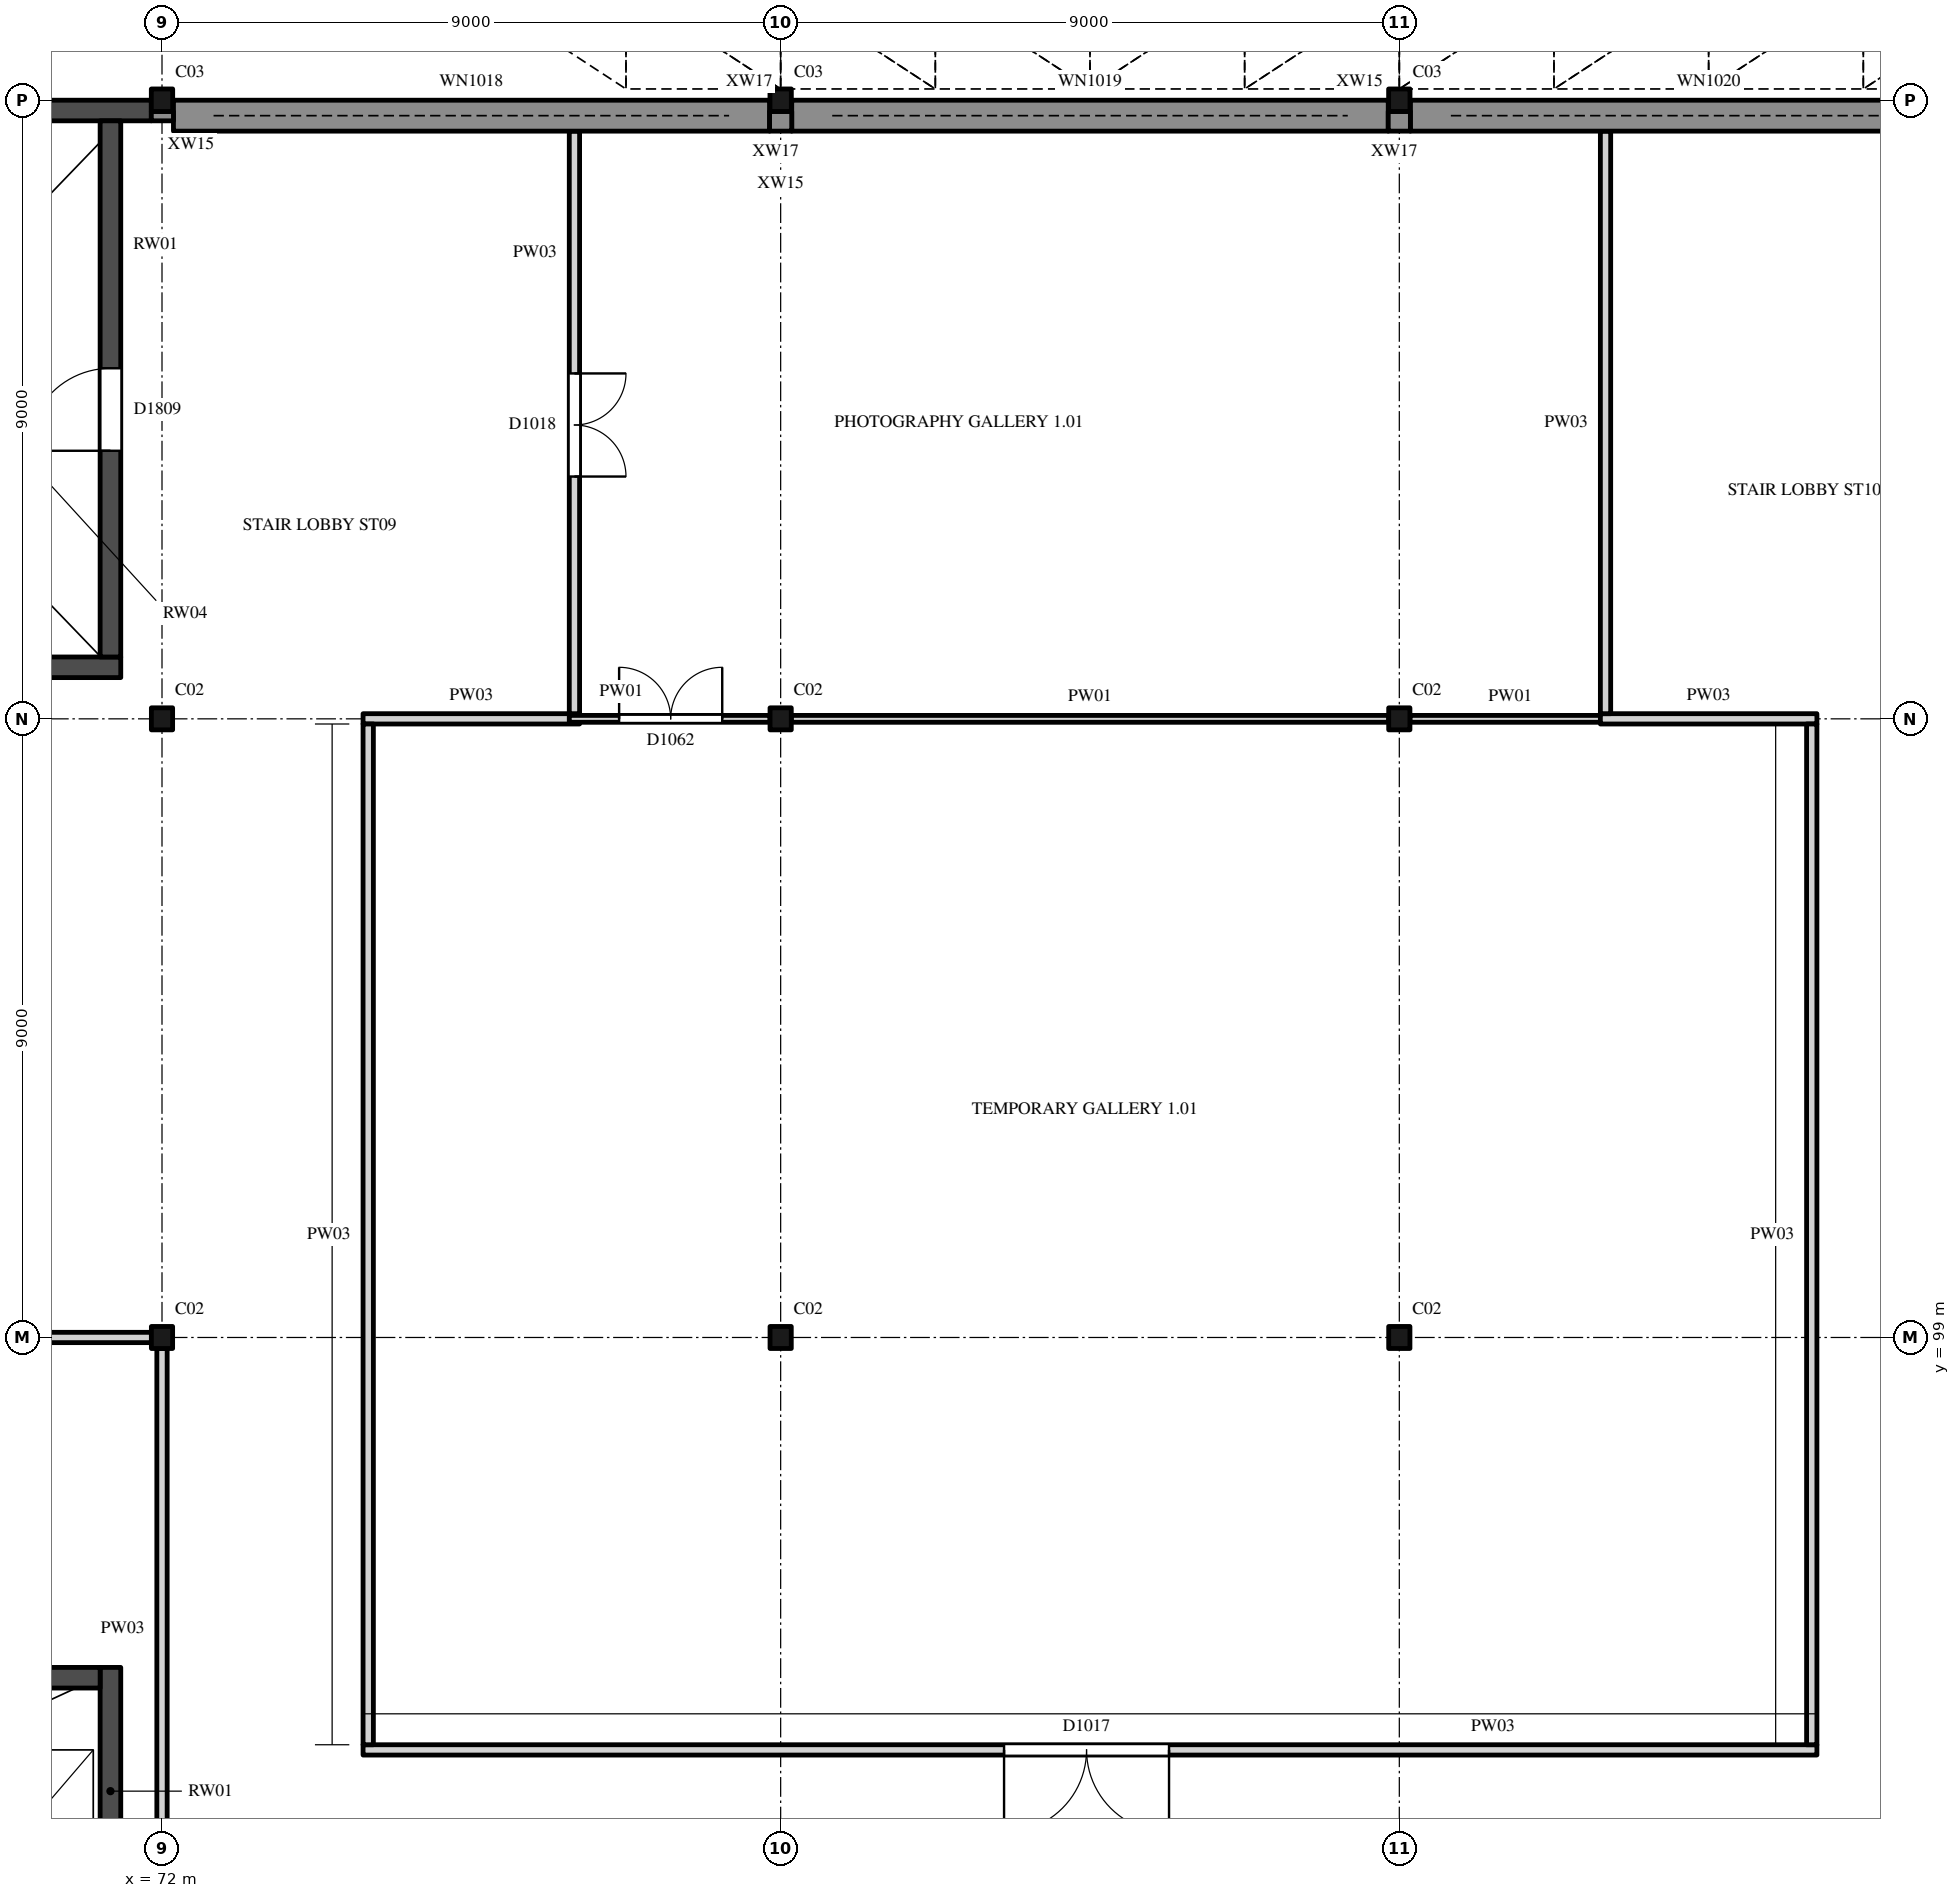
"""IFC4 building model, lengths in metres.
Left out: names, types, materials, properties, quantities, classifications, styles, units other than length and angle.
Written with IfcOpenShell. Run it as: python <this file> out.ifc"""

import sys

from ifc_helpers import new_model, si_unit, direction, frame, frame_2d, origin, origin_2d, place, context, subcontext, project, spatial, rectangle, i_section, extrude, element, fill, save


model = new_model("IFC4")
c1 = context("Model", 3, precision=1e-05, world=origin(), true_north=direction((0.0, 1.0)))
c2 = subcontext(c1, "Body", "Model", "MODEL_VIEW")
j1 = project(units=[si_unit("LENGTHUNIT", "METRE"), si_unit("PLANEANGLEUNIT", "RADIAN")], contexts=[c1])
p1 = place(None, origin())
s1 = spatial("IfcSite", under=j1, at=p1, CompositionType="ELEMENT")
p2 = place(p1, origin())
s2 = spatial("IfcBuilding", under=s1, at=p2, CompositionType="ELEMENT")
p3 = place(p2, frame((0.0, 0.0, 6.0)))
s3 = spatial("IfcBuildingStorey", under=s2, at=p3, CompositionType="ELEMENT", Elevation=6.0)
for number, where, z_axis, x_axis in (
    (1, (72.0, 99.0, 0.0), (0.0, 0.0, 1.0), (1.0, 0.0, 0.0)),
    (2, (81.0, 99.0, 0.0), (0.0, 0.0, 1.0), (1.0, 0.0, 0.0)),
    (3, (90.0, 99.0, 0.0), (0.0, 0.0, 1.0), (1.0, 0.0, 0.0)),
    (4, (72.0, 108.0, 0.0), (0.0, 0.0, 1.0), (1.0, 0.0, 0.0)),
    (5, (81.0, 108.0, 0.0), (0.0, 0.0, 1.0), (1.0, 0.0, 0.0)),
    (6, (90.0, 108.0, 0.0), (0.0, 0.0, 1.0), (1.0, 0.0, 0.0)),
):
    element("IfcColumn", number, at=place(p3, frame(where, z_axis=z_axis, x_axis=x_axis)), inside=s3, PredefinedType="COLUMN", context=c2, shape_type="SweptSolid", body=[
        extrude(i_section(OverallWidth=0.309, OverallDepth=0.321, WebThickness=0.014, FlangeThickness=0.022, FilletRadius=0.017, at=origin_2d()), origin(), (0.0, 0.0, 1.0), 5.0),
    ])
for number, where, z_axis, x_axis in (
    (7, (72.0, 117.0, 0.0), (0.0, 0.0, 1.0), (1.0, 0.0, 0.0)),
    (8, (81.0, 117.0, 0.0), (0.0, 0.0, 1.0), (1.0, 0.0, 0.0)),
    (9, (90.0, 117.0, 0.0), (0.0, 0.0, 1.0), (1.0, 0.0, 0.0)),
):
    element("IfcColumn", number, at=place(p3, frame(where, z_axis=z_axis, x_axis=x_axis)), inside=s3, PredefinedType="COLUMN", context=c2, shape_type="SweptSolid", body=[
        extrude(i_section(OverallWidth=0.311, OverallDepth=0.327, WebThickness=0.016, FlangeThickness=0.025, FilletRadius=0.017, at=origin_2d()), origin(), (0.0, 0.0, 1.0), 5.0),
    ])
p4 = place(p3, frame((63.6, 108.75, 0.0), z_axis=(0.0, 0.0, 1.0), x_axis=(1.0, 0.0, 0.0)))
e10 = element("IfcWall", 10, at=p4, inside=s3, PredefinedType="SHEAR", context=c2, shape_type="SweptSolid", body=[
    extrude(rectangle(XDim=7.8, YDim=0.3, at=frame_2d((3.9, 0.0))), origin(), (0.0, 0.0, 1.0), 5.0),
])
p5 = place(p3, frame((63.156, 116.85, 0.0), z_axis=(0.0, 0.0, 1.0), x_axis=(1.0, 0.0, 0.0)))
e11 = element("IfcWall", 11, at=p5, inside=s3, PredefinedType="SHEAR", context=c2, shape_type="SweptSolid", body=[
    extrude(rectangle(XDim=8.689, YDim=0.3, at=frame_2d((4.344, 0.0))), origin(), (0.0, 0.0, 1.0), 5.0),
])
p6 = place(p3, frame((71.25, 108.9, 0.0), z_axis=(0.0, 0.0, 1.0), x_axis=(0.0, 1.0, 0.0)))
e12 = element("IfcWall", 12, at=p6, inside=s3, PredefinedType="SHEAR", context=c2, shape_type="SweptSolid", body=[
    extrude(rectangle(XDim=7.8, YDim=0.3, at=frame_2d((3.9, 0.0))), origin(), (0.0, 0.0, 1.0), 5.0),
])
p7 = place(p6, frame((3.0, 0.0, 0.0)))
e13 = element("IfcOpeningElement", 13, at=p7, cuts=e12, PredefinedType="OPENING", context=c2, shape_type="SweptSolid", body=[
    extrude(rectangle(XDim=1.2, YDim=2.1, at=frame_2d((0.6, 1.05))), frame((0.0, 0.16, 0.0), z_axis=(0.0, -1.0, 0.0), x_axis=(1.0, 0.0, 0.0)), (0.0, 0.0, 1.0), 0.32),
])
p8 = place(p3, frame((71.25, 90.6, 0.0), z_axis=(0.0, 0.0, 1.0), x_axis=(0.0, 1.0, 0.0)))
e14 = element("IfcWall", 14, at=p8, inside=s3, PredefinedType="SHEAR", context=c2, shape_type="SweptSolid", body=[
    extrude(rectangle(XDim=3.6, YDim=0.3, at=frame_2d((1.8, 0.0))), origin(), (0.0, 0.0, 1.0), 5.0),
])
p9 = place(p3, frame((68.95, 94.05, 0.0), z_axis=(0.0, 0.0, 1.0), x_axis=(1.0, 0.0, 0.0)))
e15 = element("IfcWall", 15, at=p9, inside=s3, PredefinedType="SHEAR", context=c2, shape_type="SweptSolid", body=[
    extrude(rectangle(XDim=2.15, YDim=0.3, at=frame_2d((1.075, 0.0))), origin(), (0.0, 0.0, 1.0), 5.0),
])
p10 = place(p3, frame((72.167, 116.775, 0.0), z_axis=(0.0, 0.0, 1.0), x_axis=(1.0, 0.0, 0.0)))
e16 = element("IfcWall", 16, at=p10, inside=s3, PredefinedType="SOLIDWALL", context=c2, shape_type="SweptSolid", body=[
    extrude(rectangle(XDim=8.673, YDim=0.45, at=frame_2d((4.336, 0.0))), origin(), (0.0, 0.0, 1.0), 4.466),
])
p11 = place(p10, frame((0.583, 0.0, 1.6)))
e17 = element("IfcOpeningElement", 17, at=p11, cuts=e16, PredefinedType="OPENING", context=c2, shape_type="SweptSolid", body=[
    extrude(rectangle(XDim=7.5, YDim=1.2, at=frame_2d((3.75, 0.6))), frame((0.0, 0.235, 0.0), z_axis=(0.0, -1.0, 0.0), x_axis=(1.0, 0.0, 0.0)), (0.0, 0.0, 1.0), 0.47),
])
p12 = place(p3, frame((81.161, 116.775, 0.0), z_axis=(0.0, 0.0, 1.0), x_axis=(1.0, 0.0, 0.0)))
e18 = element("IfcWall", 18, at=p12, inside=s3, PredefinedType="SOLIDWALL", context=c2, shape_type="SweptSolid", body=[
    extrude(rectangle(XDim=8.678, YDim=0.45, at=frame_2d((4.339, 0.0))), origin(), (0.0, 0.0, 1.0), 4.466),
])
p13 = place(p12, frame((0.589, 0.0, 1.6)))
e19 = element("IfcOpeningElement", 19, at=p13, cuts=e18, PredefinedType="OPENING", context=c2, shape_type="SweptSolid", body=[
    extrude(rectangle(XDim=7.5, YDim=1.2, at=frame_2d((3.75, 0.6))), frame((0.0, 0.235, 0.0), z_axis=(0.0, -1.0, 0.0), x_axis=(1.0, 0.0, 0.0)), (0.0, 0.0, 1.0), 0.47),
])
p14 = place(p3, frame((90.161, 116.775, 0.0), z_axis=(0.0, 0.0, 1.0), x_axis=(1.0, 0.0, 0.0)))
e20 = element("IfcWall", 20, at=p14, inside=s3, PredefinedType="SOLIDWALL", context=c2, shape_type="SweptSolid", body=[
    extrude(rectangle(XDim=8.673, YDim=0.45, at=frame_2d((4.336, 0.0))), origin(), (0.0, 0.0, 1.0), 4.466),
])
p15 = place(p14, frame((0.589, 0.0, 1.6)))
e21 = element("IfcOpeningElement", 21, at=p15, cuts=e20, PredefinedType="OPENING", context=c2, shape_type="SweptSolid", body=[
    extrude(rectangle(XDim=7.5, YDim=1.2, at=frame_2d((3.75, 0.6))), frame((0.0, 0.235, 0.0), z_axis=(0.0, -1.0, 0.0), x_axis=(1.0, 0.0, 0.0)), (0.0, 0.0, 1.0), 0.47),
])
p16 = place(p3, frame((71.844, 116.768, 0.0), z_axis=(0.0, 0.0, 1.0), x_axis=(1.0, 0.0, 0.0)))
e22 = element("IfcWall", 22, at=p16, inside=s3, PredefinedType="SOLIDWALL", context=c2, shape_type="SweptSolid", body=[
    extrude(rectangle(XDim=0.322, YDim=0.136, at=frame_2d((0.161, 0.0))), origin(), (0.0, 0.0, 1.0), 5.0),
])
for number, where, z_axis, x_axis in (
    (23, (80.839, 116.693, 0.0), (0.0, 0.0, 1.0), (1.0, 0.0, 0.0)),
    (24, (89.839, 116.693, 0.0), (0.0, 0.0, 1.0), (1.0, 0.0, 0.0)),
):
    element("IfcWall", number, at=place(p3, frame(where, z_axis=z_axis, x_axis=x_axis)), inside=s3, PredefinedType="SOLIDWALL", context=c2, shape_type="SweptSolid", body=[
        extrude(rectangle(XDim=0.322, YDim=0.286, at=frame_2d((0.161, 0.0))), origin(), (0.0, 0.0, 1.0), 4.466),
    ])
p17 = place(p3, frame((74.925, 93.0, 0.0), z_axis=(0.0, 0.0, 1.0), x_axis=(1.0, 0.0, 0.0)))
e25 = element("IfcWall", 25, at=p17, inside=s3, PredefinedType="PARTITIONING", context=c2, shape_type="SweptSolid", body=[
    extrude(rectangle(XDim=21.15, YDim=0.15, at=frame_2d((10.575, 0.0))), origin(), (0.0, 0.0, 1.0), 4.473),
])
p18 = place(p17, frame((9.325, 0.0, 0.0)))
e26 = element("IfcOpeningElement", 26, at=p18, cuts=e25, PredefinedType="OPENING", context=c2, shape_type="SweptSolid", body=[
    extrude(rectangle(XDim=2.4, YDim=3.0, at=frame_2d((1.2, 1.5))), frame((0.0, 0.085, 0.0), z_axis=(0.0, -1.0, 0.0), x_axis=(1.0, 0.0, 0.0)), (0.0, 0.0, 1.0), 0.17),
])
p19 = place(p3, frame((63.155, 99.0, 0.0), z_axis=(0.0, 0.0, 1.0), x_axis=(1.0, 0.0, 0.0)))
e27 = element("IfcWall", 27, at=p19, inside=s3, PredefinedType="PARTITIONING", context=c2, shape_type="SweptSolid", body=[
    extrude(rectangle(XDim=8.691, YDim=0.15, at=frame_2d((4.345, 0.0))), origin(), (0.0, 0.0, 1.0), 4.466),
])
p20 = place(p19, frame((3.85, 0.0, 0.0)))
e28 = element("IfcOpeningElement", 28, at=p20, cuts=e27, PredefinedType="OPENING", context=c2, shape_type="SweptSolid", body=[
    extrude(rectangle(XDim=1.0, YDim=2.4, at=frame_2d((0.5, 1.2))), frame((0.0, 0.085, 0.0), z_axis=(0.0, -1.0, 0.0), x_axis=(1.0, 0.0, 0.0)), (0.0, 0.0, 1.0), 0.17),
])
p21 = place(p3, frame((74.925, 108.0, 0.0), z_axis=(0.0, 0.0, 1.0), x_axis=(1.0, 0.0, 0.0)))
e29 = element("IfcWall", 29, at=p21, inside=s3, PredefinedType="PARTITIONING", context=c2, shape_type="SweptSolid", body=[
    extrude(rectangle(XDim=3.15, YDim=0.15, at=frame_2d((1.575, 0.0))), origin(), (0.0, 0.0, 1.0), 4.466),
])
p22 = place(p3, frame((77.925, 108.0, 0.0), z_axis=(0.0, 0.0, 1.0), x_axis=(1.0, 0.0, 0.0)))
e30 = element("IfcWall", 30, at=p22, inside=s3, PredefinedType="PARTITIONING", context=c2, shape_type="SweptSolid", body=[
    extrude(rectangle(XDim=2.92, YDim=0.1, at=frame_2d((1.46, 0.0))), origin(), (0.0, 0.0, 1.0), 4.466),
])
p23 = place(p22, frame((0.725, 0.0, 0.0)))
e31 = element("IfcOpeningElement", 31, at=p23, cuts=e30, PredefinedType="OPENING", context=c2, shape_type="SweptSolid", body=[
    extrude(rectangle(XDim=1.5, YDim=2.4, at=frame_2d((0.75, 1.2))), frame((0.0, 0.06, 0.0), z_axis=(0.0, -1.0, 0.0), x_axis=(1.0, 0.0, 0.0)), (0.0, 0.0, 1.0), 0.12),
])
p24 = place(p3, frame((81.155, 108.0, 0.0), z_axis=(0.0, 0.0, 1.0), x_axis=(1.0, 0.0, 0.0)))
e32 = element("IfcWall", 32, at=p24, inside=s3, PredefinedType="PARTITIONING", context=c2, shape_type="SweptSolid", body=[
    extrude(rectangle(XDim=8.691, YDim=0.1, at=frame_2d((4.345, 0.0))), origin(), (0.0, 0.0, 1.0), 4.466),
])
p25 = place(p3, frame((90.155, 108.0, 0.0), z_axis=(0.0, 0.0, 1.0), x_axis=(1.0, 0.0, 0.0)))
e33 = element("IfcWall", 33, at=p25, inside=s3, PredefinedType="PARTITIONING", context=c2, shape_type="SweptSolid", body=[
    extrude(rectangle(XDim=2.92, YDim=0.1, at=frame_2d((1.46, 0.0))), origin(), (0.0, 0.0, 1.0), 4.466),
])
p26 = place(p3, frame((92.925, 108.0, 0.0), z_axis=(0.0, 0.0, 1.0), x_axis=(1.0, 0.0, 0.0)))
e34 = element("IfcWall", 34, at=p26, inside=s3, PredefinedType="PARTITIONING", context=c2, shape_type="SweptSolid", body=[
    extrude(rectangle(XDim=3.15, YDim=0.15, at=frame_2d((1.575, 0.0))), origin(), (0.0, 0.0, 1.0), 4.466),
])
p27 = place(p3, frame((72.0, 90.675, 0.0), z_axis=(0.0, 0.0, 1.0), x_axis=(0.0, 1.0, 0.0)))
e35 = element("IfcWall", 35, at=p27, inside=s3, PredefinedType="PARTITIONING", context=c2, shape_type="SweptSolid", body=[
    extrude(rectangle(XDim=8.165, YDim=0.15, at=frame_2d((4.082, 0.0))), origin(), (0.0, 0.0, 1.0), 4.365),
])
p28 = place(p3, frame((75.0, 93.075, 0.0), z_axis=(0.0, 0.0, 1.0), x_axis=(0.0, 1.0, 0.0)))
e36 = element("IfcWall", 36, at=p28, inside=s3, PredefinedType="PARTITIONING", context=c2, shape_type="SweptSolid", body=[
    extrude(rectangle(XDim=14.85, YDim=0.15, at=frame_2d((7.425, 0.0))), origin(), (0.0, 0.0, 1.0), 4.825),
])
p29 = place(p3, frame((78.0, 108.075, 0.0), z_axis=(0.0, 0.0, 1.0), x_axis=(0.0, 1.0, 0.0)))
e37 = element("IfcWall", 37, at=p29, inside=s3, PredefinedType="PARTITIONING", context=c2, shape_type="SweptSolid", body=[
    extrude(rectangle(XDim=8.475, YDim=0.15, at=frame_2d((4.238, 0.0))), origin(), (0.0, 0.0, 1.0), 4.825),
])
p30 = place(p29, frame((3.45, 0.0, 0.0)))
e38 = element("IfcOpeningElement", 38, at=p30, cuts=e37, PredefinedType="OPENING", context=c2, shape_type="SweptSolid", body=[
    extrude(rectangle(XDim=1.5, YDim=2.4, at=frame_2d((0.75, 1.2))), frame((0.0, 0.085, 0.0), z_axis=(0.0, -1.0, 0.0), x_axis=(1.0, 0.0, 0.0)), (0.0, 0.0, 1.0), 0.17),
])
p31 = place(p3, frame((93.0, 108.075, 0.0), z_axis=(0.0, 0.0, 1.0), x_axis=(0.0, 1.0, 0.0)))
e39 = element("IfcWall", 39, at=p31, inside=s3, PredefinedType="PARTITIONING", context=c2, shape_type="SweptSolid", body=[
    extrude(rectangle(XDim=8.475, YDim=0.15, at=frame_2d((4.238, 0.0))), origin(), (0.0, 0.0, 1.0), 4.825),
])
p32 = place(p3, frame((96.0, 93.075, 0.0), z_axis=(0.0, 0.0, 1.0), x_axis=(0.0, 1.0, 0.0)))
e40 = element("IfcWall", 40, at=p32, inside=s3, PredefinedType="PARTITIONING", context=c2, shape_type="SweptSolid", body=[
    extrude(rectangle(XDim=14.85, YDim=0.15, at=frame_2d((7.425, 0.0))), origin(), (0.0, 0.0, 1.0), 4.825),
])
p33 = place(p7, origin())
e41 = element("IfcDoor", 41, at=p33, inside=s3, OperationType="SINGLE_SWING_RIGHT", PredefinedType="DOOR", context=c2, shape_type="SweptSolid", body=[
    extrude(rectangle(XDim=1.2, YDim=2.1, at=frame_2d((0.6, 1.05))), frame((0.0, 0.025, 0.0), z_axis=(0.0, -1.0, 0.0), x_axis=(1.0, 0.0, 0.0)), (0.0, 0.0, 1.0), 0.05),
])
fill(e13, e41)
p34 = place(p11, origin())
e42 = element("IfcWindow", 42, at=p34, inside=s3, PartitioningType="SINGLE_PANEL", PredefinedType="WINDOW", context=c2, shape_type="SweptSolid", body=[
    extrude(rectangle(XDim=7.5, YDim=1.2, at=frame_2d((3.75, 0.6))), frame((0.0, 0.03, 0.0), z_axis=(0.0, -1.0, 0.0), x_axis=(1.0, 0.0, 0.0)), (0.0, 0.0, 1.0), 0.06),
])
fill(e17, e42)
p35 = place(p13, origin())
e43 = element("IfcWindow", 43, at=p35, inside=s3, PartitioningType="SINGLE_PANEL", PredefinedType="WINDOW", context=c2, shape_type="SweptSolid", body=[
    extrude(rectangle(XDim=7.5, YDim=1.2, at=frame_2d((3.75, 0.6))), frame((0.0, 0.03, 0.0), z_axis=(0.0, -1.0, 0.0), x_axis=(1.0, 0.0, 0.0)), (0.0, 0.0, 1.0), 0.06),
])
fill(e19, e43)
p36 = place(p15, origin())
e44 = element("IfcWindow", 44, at=p36, inside=s3, PartitioningType="SINGLE_PANEL", PredefinedType="WINDOW", context=c2, shape_type="SweptSolid", body=[
    extrude(rectangle(XDim=7.5, YDim=1.2, at=frame_2d((3.75, 0.6))), frame((0.0, 0.03, 0.0), z_axis=(0.0, -1.0, 0.0), x_axis=(1.0, 0.0, 0.0)), (0.0, 0.0, 1.0), 0.06),
])
fill(e21, e44)
p37 = place(p18, origin())
e45 = element("IfcDoor", 45, at=p37, inside=s3, OperationType="DOUBLE_DOOR_SINGLE_SWING", PredefinedType="DOOR", context=c2, shape_type="SweptSolid", body=[
    extrude(rectangle(XDim=2.4, YDim=3.0, at=frame_2d((1.2, 1.5))), frame((0.0, 0.025, 0.0), z_axis=(0.0, -1.0, 0.0), x_axis=(1.0, 0.0, 0.0)), (0.0, 0.0, 1.0), 0.05),
])
fill(e26, e45)
p38 = place(p30, origin())
e46 = element("IfcDoor", 46, at=p38, inside=s3, OperationType="DOUBLE_DOOR_SINGLE_SWING", PredefinedType="DOOR", context=c2, shape_type="SweptSolid", body=[
    extrude(rectangle(XDim=1.5, YDim=2.4, at=frame_2d((0.75, 1.2))), frame((0.0, 0.025, 0.0), z_axis=(0.0, -1.0, 0.0), x_axis=(1.0, 0.0, 0.0)), (0.0, 0.0, 1.0), 0.05),
])
fill(e38, e46)
p39 = place(p23, origin())
e47 = element("IfcDoor", 47, at=p39, inside=s3, OperationType="DOUBLE_DOOR_SINGLE_SWING", PredefinedType="DOOR", context=c2, shape_type="SweptSolid", body=[
    extrude(rectangle(XDim=1.5, YDim=2.4, at=frame_2d((0.75, 1.2))), frame((0.0, 0.025, 0.0), z_axis=(0.0, -1.0, 0.0), x_axis=(1.0, 0.0, 0.0)), (0.0, 0.0, 1.0), 0.05),
])
fill(e31, e47)
save(model, sys.argv[1])
